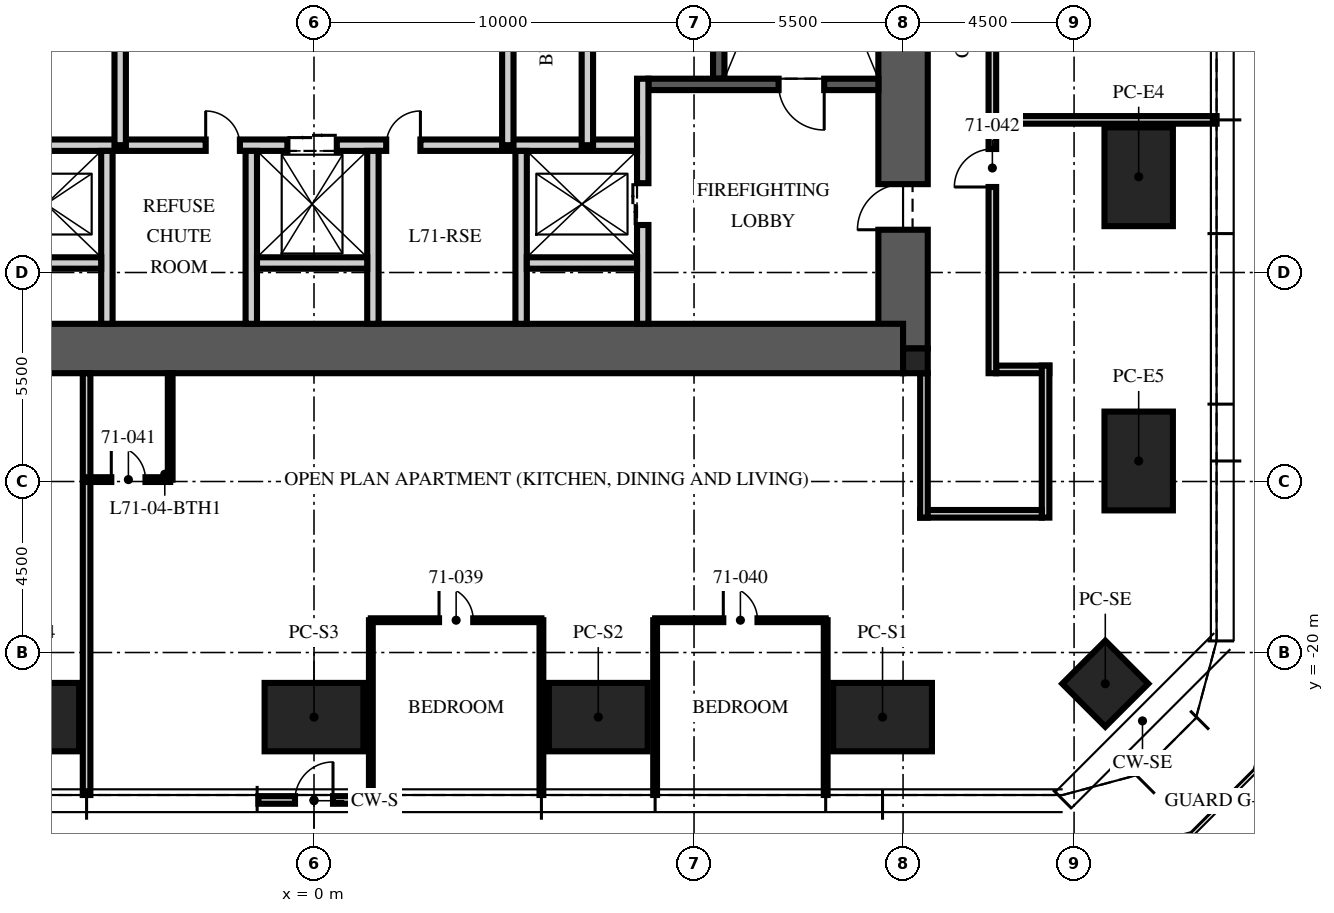
"""IFC4 building model, lengths in metres.
Left out: names, types, materials, properties, quantities, classifications, styles, units other than length and angle.
Written with IfcOpenShell. Run it as: python <this file> out.ifc"""

import sys

from ifc_helpers import new_model, si_unit, direction, frame, frame_2d, origin, origin_2d, place, context, subcontext, project, spatial, rectangle, extrude, element, fill, save


model = new_model("IFC4")
c1 = context("Model", 3, precision=1e-05, world=origin(), true_north=direction((0.0, 1.0)))
c2 = subcontext(c1, "Body", "Model", "MODEL_VIEW")
j1 = project(units=[si_unit("LENGTHUNIT", "METRE"), si_unit("PLANEANGLEUNIT", "RADIAN")], contexts=[c1])
p1 = place(None, origin())
s1 = spatial("IfcSite", under=j1, at=p1, CompositionType="ELEMENT")
p2 = place(p1, origin())
s2 = spatial("IfcBuilding", under=s1, at=p2, CompositionType="ELEMENT")
p3 = place(p2, frame((0.0, 0.0, 285.75)))
s3 = spatial("IfcBuildingStorey", under=s2, at=p3, CompositionType="ELEMENT", Elevation=285.75)
p4 = place(p3, frame((15.5, -12.0, -0.25), z_axis=(0.0, 0.0, 1.0), x_axis=(0.0, 1.0, 0.0)))
e1 = element("IfcWall", 1, at=p4, inside=s3, PredefinedType="SHEAR", context=c2, shape_type="SweptSolid", body=[
    extrude(rectangle(XDim=24.0, YDim=1.3, at=frame_2d((12.0, 0.0))), origin(), (0.0, 0.0, 1.0), 3.75),
])
p5 = place(p4, frame((3.125, 0.0, 0.25)))
e2 = element("IfcOpeningElement", 2, at=p5, cuts=e1, PredefinedType="OPENING", context=c2, shape_type="SweptSolid", body=[
    extrude(rectangle(XDim=1.2, YDim=2.1, at=frame_2d((0.6, 1.05))), frame((0.0, 0.66, 0.0), z_axis=(0.0, -1.0, 0.0), x_axis=(1.0, 0.0, 0.0)), (0.0, 0.0, 1.0), 1.32),
])
p6 = place(p4, frame((19.375, 0.0, 0.25)))
e3 = element("IfcOpeningElement", 3, at=p6, cuts=e1, PredefinedType="OPENING", context=c2, shape_type="SweptSolid", body=[
    extrude(rectangle(XDim=1.8, YDim=2.1, at=frame_2d((0.9, 1.05))), frame((0.0, 0.66, 0.0), z_axis=(0.0, -1.0, 0.0), x_axis=(1.0, 0.0, 0.0)), (0.0, 0.0, 1.0), 1.32),
])
p7 = place(p3, frame((-15.5, -12.0, -0.25), z_axis=(0.0, 0.0, 1.0), x_axis=(1.0, 0.0, 0.0)))
e4 = element("IfcWall", 4, at=p7, inside=s3, PredefinedType="SHEAR", context=c2, shape_type="SweptSolid", body=[
    extrude(rectangle(XDim=31.0, YDim=1.3, at=frame_2d((15.5, 0.0))), origin(), (0.0, 0.0, 1.0), 3.75),
])
p8 = place(p3, frame((15.825, -12.325, -0.25), z_axis=(0.0, 0.0, 1.0), x_axis=(1.0, 0.0, 0.0)))
e5 = element("IfcColumn", 5, at=p8, inside=s3, PredefinedType="COLUMN", context=c2, shape_type="SweptSolid", body=[
    extrude(rectangle(XDim=0.65, YDim=0.65, at=origin_2d()), origin(), (0.0, 0.0, 1.0), 3.75),
])
p9 = place(p3, frame((21.7, -7.48, -0.09), z_axis=(0.0, 0.0, 1.0), x_axis=(0.0, 1.0, 0.0)))
e6 = element("IfcColumn", 6, at=p9, inside=s3, PredefinedType="COLUMN", context=c2, shape_type="SweptSolid", body=[
    extrude(rectangle(XDim=2.6, YDim=1.8, at=origin_2d()), origin(), (0.0, 0.0, 1.0), 3.84),
])
for number, where, z_axis, x_axis in (
    (7, (21.7, -14.96, 0.04), (0.0, 0.0, 1.0), (0.0, 1.0, 0.0)),
    (8, (14.96, -21.7, 0.04), (0.0, 0.0, 1.0), (1.0, 0.0, 0.0)),
):
    element("IfcColumn", number, at=place(p3, frame(where, z_axis=z_axis, x_axis=x_axis)), inside=s3, PredefinedType="COLUMN", context=c2, shape_type="SweptSolid", body=[
        extrude(rectangle(XDim=2.6, YDim=1.8, at=origin_2d()), origin(), (0.0, 0.0, 1.0), 3.71),
    ])
p10 = place(p3, frame((7.48, -21.7, -0.09), z_axis=(0.0, 0.0, 1.0), x_axis=(1.0, 0.0, 0.0)))
e9 = element("IfcColumn", 9, at=p10, inside=s3, PredefinedType="COLUMN", context=c2, shape_type="SweptSolid", body=[
    extrude(rectangle(XDim=2.6, YDim=1.8, at=origin_2d()), origin(), (0.0, 0.0, 1.0), 3.84),
])
p11 = place(p3, frame((0.0, -21.7, -0.23), z_axis=(0.0, 0.0, 1.0), x_axis=(1.0, 0.0, 0.0)))
e10 = element("IfcColumn", 10, at=p11, inside=s3, PredefinedType="COLUMN", context=c2, shape_type="SweptSolid", body=[
    extrude(rectangle(XDim=2.6, YDim=1.8, at=origin_2d()), origin(), (0.0, 0.0, 1.0), 3.98),
])
p12 = place(p3, frame((-7.48, -21.7, -0.09), z_axis=(0.0, 0.0, 1.0), x_axis=(1.0, 0.0, 0.0)))
e11 = element("IfcColumn", 11, at=p12, inside=s3, PredefinedType="COLUMN", context=c2, shape_type="SweptSolid", body=[
    extrude(rectangle(XDim=2.6, YDim=1.8, at=origin_2d()), origin(), (0.0, 0.0, 1.0), 3.84),
])
p13 = place(p3, frame((20.821, -20.821, -0.19), z_axis=(0.0, 0.0, 1.0), x_axis=(0.707106781187, 0.707106781187, 0.0)))
e12 = element("IfcColumn", 12, at=p13, inside=s3, PredefinedType="COLUMN", context=c2, shape_type="SweptSolid", body=[
    extrude(rectangle(XDim=1.6, YDim=1.6, at=origin_2d()), origin(), (0.0, 0.0, 1.0), 3.94),
])
p14 = place(p3, frame((-1.463, -23.88, 0.0), z_axis=(0.0, 0.0, 1.0), x_axis=(1.0, 0.0, 0.0)))
e13 = element("IfcWall", 13, at=p14, inside=s3, PredefinedType="ELEMENTEDWALL", context=c2, shape_type="SweptSolid", body=[
    extrude(rectangle(XDim=2.927, YDim=0.2, at=frame_2d((1.463, 0.0))), origin(), (0.0, 0.0, 1.0), 3.75),
])
p15 = place(p14, frame((0.963, 0.0, 0.0)))
e14 = element("IfcOpeningElement", 14, at=p15, cuts=e13, PredefinedType="OPENING", context=c2, shape_type="SweptSolid", body=[
    extrude(rectangle(XDim=1.0, YDim=2.4, at=frame_2d((0.5, 1.2))), frame((0.0, 0.11, 0.0), z_axis=(0.0, -1.0, 0.0), x_axis=(1.0, 0.0, 0.0)), (0.0, 0.0, 1.0), 0.22),
])
p16 = place(p3, frame((10.65, -4.9, 0.0), z_axis=(0.0, 0.0, 1.0), x_axis=(0.0, 1.0, 0.0)))
e15 = element("IfcWall", 15, at=p16, inside=s3, PredefinedType="SOLIDWALL", context=c2, shape_type="SweptSolid", body=[
    extrude(rectangle(XDim=10.1, YDim=0.3, at=frame_2d((5.05, 0.0))), origin(), (0.0, 0.0, 1.0), 3.5),
])
p17 = place(p3, frame((14.85, -5.05, 0.0), z_axis=(0.0, 0.0, 1.0), x_axis=(-1.0, 0.0, 0.0)))
e16 = element("IfcWall", 16, at=p17, inside=s3, PredefinedType="SOLIDWALL", context=c2, shape_type="SweptSolid", body=[
    extrude(rectangle(XDim=6.05, YDim=0.3, at=frame_2d((3.025, 0.0))), origin(), (0.0, 0.0, 1.0), 3.5),
])
p18 = place(p17, frame((1.425, 0.0, 0.0)))
e17 = element("IfcOpeningElement", 17, at=p18, cuts=e16, PredefinedType="OPENING", context=c2, shape_type="SweptSolid", body=[
    extrude(rectangle(XDim=1.2, YDim=2.1, at=frame_2d((0.6, 1.05))), frame((0.0, 0.16, 0.0), z_axis=(0.0, -1.0, 0.0), x_axis=(1.0, 0.0, 0.0)), (0.0, 0.0, 1.0), 0.32),
])
p19 = place(p3, frame((8.65, -11.35, 0.0), z_axis=(0.0, 0.0, 1.0), x_axis=(0.0, 1.0, 0.0)))
e18 = element("IfcWall", 18, at=p19, inside=s3, PredefinedType="PARTITIONING", context=c2, shape_type="SweptSolid", body=[
    extrude(rectangle(XDim=6.45, YDim=0.3, at=frame_2d((3.225, 0.0))), origin(), (0.0, 0.0, 1.0), 3.5),
])
p20 = place(p19, frame((2.6, 0.0, 0.0)))
e19 = element("IfcOpeningElement", 19, at=p20, cuts=e18, PredefinedType="OPENING", context=c2, shape_type="SweptSolid", body=[
    extrude(rectangle(XDim=1.1, YDim=2.1, at=frame_2d((0.55, 1.05))), frame((0.0, 0.16, 0.0), z_axis=(0.0, -1.0, 0.0), x_axis=(1.0, 0.0, 0.0)), (0.0, 0.0, 1.0), 0.32),
])
p21 = place(p3, frame((-8.5, -6.65, 0.0), z_axis=(0.0, 0.0, 1.0), x_axis=(1.0, 0.0, 0.0)))
e20 = element("IfcWall", 20, at=p21, inside=s3, PredefinedType="PARTITIONING", context=c2, shape_type="SweptSolid", body=[
    extrude(rectangle(XDim=17.0, YDim=0.3, at=frame_2d((8.5, 0.0))), origin(), (0.0, 0.0, 1.0), 3.5),
])
p22 = place(p21, frame((7.8, 0.0, 0.0)))
e21 = element("IfcOpeningElement", 21, at=p22, cuts=e20, PredefinedType="OPENING", context=c2, shape_type="SweptSolid", body=[
    extrude(rectangle(XDim=1.3, YDim=2.4, at=frame_2d((0.65, 1.2))), frame((0.0, 0.16, 0.0), z_axis=(0.0, -1.0, 0.0), x_axis=(1.0, 0.0, 0.0)), (0.0, 0.0, 1.0), 0.32),
])
p23 = place(p21, frame((5.65, 0.0, 0.0)))
e22 = element("IfcOpeningElement", 22, at=p23, cuts=e20, PredefinedType="OPENING", context=c2, shape_type="SweptSolid", body=[
    extrude(rectangle(XDim=0.9, YDim=2.1, at=frame_2d((0.45, 1.05))), frame((0.0, 0.16, 0.0), z_axis=(0.0, -1.0, 0.0), x_axis=(1.0, 0.0, 0.0)), (0.0, 0.0, 1.0), 0.32),
])
p24 = place(p21, frame((10.4, 0.0, 0.0)))
e23 = element("IfcOpeningElement", 23, at=p24, cuts=e20, PredefinedType="OPENING", context=c2, shape_type="SweptSolid", body=[
    extrude(rectangle(XDim=0.9, YDim=2.1, at=frame_2d((0.45, 1.05))), frame((0.0, 0.16, 0.0), z_axis=(0.0, -1.0, 0.0), x_axis=(1.0, 0.0, 0.0)), (0.0, 0.0, 1.0), 0.32),
])
for number, where, z_axis, x_axis in (
    (24, (-5.45, -11.35, 0.0), (0.0, 0.0, 1.0), (0.0, 1.0, 0.0)),
    (25, (-1.65, -11.35, 0.0), (0.0, 0.0, 1.0), (0.0, 1.0, 0.0)),
    (26, (1.55, -11.35, 0.0), (0.0, 0.0, 1.0), (0.0, 1.0, 0.0)),
    (27, (5.45, -11.35, 0.0), (0.0, 0.0, 1.0), (0.0, 1.0, 0.0)),
):
    element("IfcWall", number, at=place(p3, frame(where, z_axis=z_axis, x_axis=x_axis)), inside=s3, PredefinedType="PARTITIONING", context=c2, shape_type="SweptSolid", body=[
        extrude(rectangle(XDim=4.55, YDim=0.3, at=frame_2d((2.275, 0.0))), origin(), (0.0, 0.0, 1.0), 3.5),
    ])
for number, where, z_axis, x_axis in (
    (28, (-8.5, -9.75, 0.0), (0.0, 0.0, 1.0), (1.0, 0.0, 0.0)),
    (29, (-1.5, -9.75, 0.0), (0.0, 0.0, 1.0), (1.0, 0.0, 0.0)),
    (30, (5.6, -9.75, 0.0), (0.0, 0.0, 1.0), (1.0, 0.0, 0.0)),
):
    element("IfcWall", number, at=place(p3, frame(where, z_axis=z_axis, x_axis=x_axis)), inside=s3, PredefinedType="PARTITIONING", context=c2, shape_type="SweptSolid", body=[
        extrude(rectangle(XDim=2.9, YDim=0.3, at=frame_2d((1.45, 0.0))), origin(), (0.0, 0.0, 1.0), 3.5),
    ])
p25 = place(p3, frame((-5.1, -6.65, 0.0), z_axis=(0.0, 0.0, 1.0), x_axis=(0.0, 1.0, 0.0)))
e31 = element("IfcWall", 31, at=p25, inside=s3, PredefinedType="PARTITIONING", context=c2, shape_type="SweptSolid", body=[
    extrude(rectangle(XDim=9.45, YDim=0.3, at=frame_2d((4.725, 0.0))), origin(), (0.0, 0.0, 1.0), 3.5),
])
p26 = place(p25, frame((2.648, 0.0, 0.0)))
e32 = element("IfcOpeningElement", 32, at=p26, cuts=e31, PredefinedType="OPENING", context=c2, shape_type="SweptSolid", body=[
    extrude(rectangle(XDim=0.9, YDim=2.1, at=frame_2d((0.45, 1.05))), frame((0.0, 0.16, 0.0), z_axis=(0.0, -1.0, 0.0), x_axis=(1.0, 0.0, 0.0)), (0.0, 0.0, 1.0), 0.32),
])
p27 = place(p25, frame((7.373, 0.0, 0.0)))
e33 = element("IfcOpeningElement", 33, at=p27, cuts=e31, PredefinedType="OPENING", context=c2, shape_type="SweptSolid", body=[
    extrude(rectangle(XDim=0.9, YDim=2.1, at=frame_2d((0.45, 1.05))), frame((0.0, 0.16, 0.0), z_axis=(0.0, -1.0, 0.0), x_axis=(1.0, 0.0, 0.0)), (0.0, 0.0, 1.0), 0.32),
])
p28 = place(p3, frame((5.1, -6.65, 0.0), z_axis=(0.0, 0.0, 1.0), x_axis=(0.0, 1.0, 0.0)))
e34 = element("IfcWall", 34, at=p28, inside=s3, PredefinedType="PARTITIONING", context=c2, shape_type="SweptSolid", body=[
    extrude(rectangle(XDim=9.45, YDim=0.3, at=frame_2d((4.725, 0.0))), origin(), (0.0, 0.0, 1.0), 3.5),
])
p29 = place(p28, frame((4.275, 0.0, 0.0)))
e35 = element("IfcOpeningElement", 35, at=p29, cuts=e34, PredefinedType="OPENING", context=c2, shape_type="SweptSolid", body=[
    extrude(rectangle(XDim=0.9, YDim=2.1, at=frame_2d((0.45, 1.05))), frame((0.0, 0.16, 0.0), z_axis=(0.0, -1.0, 0.0), x_axis=(1.0, 0.0, 0.0)), (0.0, 0.0, 1.0), 0.32),
])
p30 = place(p3, frame((7.193, -6.65, 0.0), z_axis=(0.0, 0.0, 1.0), x_axis=(0.0, 1.0, 0.0)))
e36 = element("IfcWall", 36, at=p30, inside=s3, PredefinedType="PARTITIONING", context=c2, shape_type="SweptSolid", body=[
    extrude(rectangle(XDim=9.45, YDim=0.3, at=frame_2d((4.725, 0.0))), origin(), (0.0, 0.0, 1.0), 3.5),
])
p31 = place(p3, frame((17.95, -12.55, 0.0), z_axis=(0.0, 0.0, 1.0), x_axis=(1.0, 0.0, 0.0)))
e37 = element("IfcWall", 37, at=p31, inside=s3, PredefinedType="PARTITIONING", context=c2, shape_type="SweptSolid", body=[
    extrude(rectangle(XDim=1.4, YDim=0.2, at=frame_2d((0.7, 0.0))), origin(), (0.0, 0.0, 1.0), 3.5),
])
p32 = place(p3, frame((19.25, -12.45, 0.0), z_axis=(0.0, 0.0, 1.0), x_axis=(0.0, -1.0, 0.0)))
e38 = element("IfcWall", 38, at=p32, inside=s3, PredefinedType="PARTITIONING", context=c2, shape_type="SweptSolid", body=[
    extrude(rectangle(XDim=4.0, YDim=0.2, at=frame_2d((2.0, 0.0))), origin(), (0.0, 0.0, 1.0), 2.9),
])
p33 = place(p3, frame((19.15, -16.35, 0.0), z_axis=(0.0, 0.0, 1.0), x_axis=(-1.0, 0.0, 0.0)))
e39 = element("IfcWall", 39, at=p33, inside=s3, PredefinedType="PARTITIONING", context=c2, shape_type="SweptSolid", body=[
    extrude(rectangle(XDim=3.2, YDim=0.2, at=frame_2d((1.6, 0.0))), origin(), (0.0, 0.0, 1.0), 2.6),
])
p34 = place(p3, frame((16.05, -16.45, 0.0), z_axis=(0.0, 0.0, 1.0), x_axis=(0.0, 1.0, 0.0)))
e40 = element("IfcWall", 40, at=p34, inside=s3, PredefinedType="PARTITIONING", context=c2, shape_type="SweptSolid", body=[
    extrude(rectangle(XDim=3.8, YDim=0.2, at=frame_2d((1.9, 0.0))), origin(), (0.0, 0.0, 1.0), 2.6),
])
p35 = place(p3, frame((17.95, -5.984, 0.0), z_axis=(0.0, 0.0, 1.0), x_axis=(1.0, 0.0, 0.0)))
e41 = element("IfcWall", 41, at=p35, inside=s3, PredefinedType="PARTITIONING", context=c2, shape_type="SweptSolid", body=[
    extrude(rectangle(XDim=5.8, YDim=0.2, at=frame_2d((2.9, 0.0))), origin(), (0.0, 0.0, 1.0), 3.01),
])
p36 = place(p3, frame((-5.984, -12.65, 0.0), z_axis=(0.0, 0.0, 1.0), x_axis=(0.0, -1.0, 0.0)))
e42 = element("IfcWall", 42, at=p36, inside=s3, PredefinedType="PARTITIONING", context=c2, shape_type="SweptSolid", body=[
    extrude(rectangle(XDim=11.1, YDim=0.2, at=frame_2d((5.55, 0.0))), origin(), (0.0, 0.0, 1.0), 3.01),
])
for number, where, z_axis, x_axis in (
    (43, (1.496, -19.15, 0.0), (0.0, 0.0, 1.0), (0.0, -1.0, 0.0)),
    (44, (5.984, -19.15, 0.0), (0.0, 0.0, 1.0), (0.0, -1.0, 0.0)),
    (45, (8.976, -19.15, 0.0), (0.0, 0.0, 1.0), (0.0, -1.0, 0.0)),
    (46, (13.464, -19.15, 0.0), (0.0, 0.0, 1.0), (0.0, -1.0, 0.0)),
):
    element("IfcWall", number, at=place(p3, frame(where, z_axis=z_axis, x_axis=x_axis)), inside=s3, PredefinedType="PARTITIONING", context=c2, shape_type="SweptSolid", body=[
        extrude(rectangle(XDim=4.6, YDim=0.1, at=frame_2d((2.3, 0.0))), origin(), (0.0, 0.0, 1.0), 3.01),
    ])
p37 = place(p3, frame((1.496, -19.15, 0.0), z_axis=(0.0, 0.0, 1.0), x_axis=(1.0, 0.0, 0.0)))
e47 = element("IfcWall", 47, at=p37, inside=s3, PredefinedType="PARTITIONING", context=c2, shape_type="SweptSolid", body=[
    extrude(rectangle(XDim=4.488, YDim=0.1, at=frame_2d((2.244, 0.0))), origin(), (0.0, 0.0, 1.0), 2.91),
])
p38 = place(p37, frame((1.794, 0.0, 0.0)))
e48 = element("IfcOpeningElement", 48, at=p38, cuts=e47, PredefinedType="OPENING", context=c2, shape_type="SweptSolid", body=[
    extrude(rectangle(XDim=0.9, YDim=2.1, at=frame_2d((0.45, 1.05))), frame((0.0, 0.06, 0.0), z_axis=(0.0, -1.0, 0.0), x_axis=(1.0, 0.0, 0.0)), (0.0, 0.0, 1.0), 0.12),
])
p39 = place(p3, frame((8.976, -19.15, 0.0), z_axis=(0.0, 0.0, 1.0), x_axis=(1.0, 0.0, 0.0)))
e49 = element("IfcWall", 49, at=p39, inside=s3, PredefinedType="PARTITIONING", context=c2, shape_type="SweptSolid", body=[
    extrude(rectangle(XDim=4.488, YDim=0.1, at=frame_2d((2.244, 0.0))), origin(), (0.0, 0.0, 1.0), 2.91),
])
p40 = place(p39, frame((1.794, 0.0, 0.0)))
e50 = element("IfcOpeningElement", 50, at=p40, cuts=e49, PredefinedType="OPENING", context=c2, shape_type="SweptSolid", body=[
    extrude(rectangle(XDim=0.9, YDim=2.1, at=frame_2d((0.45, 1.05))), frame((0.0, 0.06, 0.0), z_axis=(0.0, -1.0, 0.0), x_axis=(1.0, 0.0, 0.0)), (0.0, 0.0, 1.0), 0.12),
])
p41 = place(p3, frame((-5.984, -15.45, 0.0), z_axis=(0.0, 0.0, 1.0), x_axis=(1.0, 0.0, 0.0)))
e51 = element("IfcWall", 51, at=p41, inside=s3, PredefinedType="PARTITIONING", context=c2, shape_type="SweptSolid", body=[
    extrude(rectangle(XDim=2.2, YDim=0.125, at=frame_2d((1.1, 0.0))), origin(), (0.0, 0.0, 1.0), 2.91),
])
p42 = place(p41, frame((0.65, 0.0, 0.0)))
e52 = element("IfcOpeningElement", 52, at=p42, cuts=e51, PredefinedType="OPENING", context=c2, shape_type="SweptSolid", body=[
    extrude(rectangle(XDim=0.9, YDim=2.1, at=frame_2d((0.45, 1.05))), frame((0.0, 0.073, 0.0), z_axis=(0.0, -1.0, 0.0), x_axis=(1.0, 0.0, 0.0)), (0.0, 0.0, 1.0), 0.145),
])
p43 = place(p3, frame((-3.784, -12.65, 0.0), z_axis=(0.0, 0.0, 1.0), x_axis=(0.0, -1.0, 0.0)))
e53 = element("IfcWall", 53, at=p43, inside=s3, PredefinedType="PARTITIONING", context=c2, shape_type="SweptSolid", body=[
    extrude(rectangle(XDim=2.8, YDim=0.125, at=frame_2d((1.4, 0.0))), origin(), (0.0, 0.0, 1.0), 2.91),
])
p44 = place(p3, frame((17.85, -12.65, 0.0), z_axis=(0.0, 0.0, 1.0), x_axis=(0.0, 1.0, 0.0)))
e54 = element("IfcWall", 54, at=p44, inside=s3, PredefinedType="PARTITIONING", context=c2, shape_type="SweptSolid", body=[
    extrude(rectangle(XDim=25.5, YDim=0.2, at=frame_2d((12.75, 0.0))), origin(), (0.0, 0.0, 1.0), 2.9),
])
p45 = place(p44, frame((23.186, 0.0, 0.0)))
e55 = element("IfcOpeningElement", 55, at=p45, cuts=e54, PredefinedType="OPENING", context=c2, shape_type="SweptSolid", body=[
    extrude(rectangle(XDim=1.0, YDim=2.2, at=frame_2d((0.5, 1.1))), frame((0.0, 0.11, 0.0), z_axis=(0.0, -1.0, 0.0), x_axis=(1.0, 0.0, 0.0)), (0.0, 0.0, 1.0), 0.22),
])
p46 = place(p44, frame((4.9, 0.0, 0.0)))
e56 = element("IfcOpeningElement", 56, at=p46, cuts=e54, PredefinedType="OPENING", context=c2, shape_type="SweptSolid", body=[
    extrude(rectangle(XDim=1.0, YDim=2.2, at=frame_2d((0.5, 1.1))), frame((0.0, 0.11, 0.0), z_axis=(0.0, -1.0, 0.0), x_axis=(1.0, 0.0, 0.0)), (0.0, 0.0, 1.0), 0.22),
])
p47 = place(p15, origin())
e57 = element("IfcDoor", 57, at=p47, inside=s3, OperationType="SINGLE_SWING_LEFT", PredefinedType="DOOR", context=c2, shape_type="SweptSolid", body=[
    extrude(rectangle(XDim=1.0, YDim=2.4, at=frame_2d((0.5, 1.2))), frame((0.0, 0.025, 0.0), z_axis=(0.0, -1.0, 0.0), x_axis=(1.0, 0.0, 0.0)), (0.0, 0.0, 1.0), 0.05),
])
fill(e14, e57)
p48 = place(p18, origin())
e58 = element("IfcDoor", 58, at=p48, inside=s3, OperationType="SINGLE_SWING_LEFT", PredefinedType="DOOR", context=c2, shape_type="SweptSolid", body=[
    extrude(rectangle(XDim=1.2, YDim=2.1, at=frame_2d((0.6, 1.05))), frame((0.0, 0.025, 0.0), z_axis=(0.0, -1.0, 0.0), x_axis=(1.0, 0.0, 0.0)), (0.0, 0.0, 1.0), 0.05),
])
fill(e17, e58)
p49 = place(p5, origin())
e59 = element("IfcDoor", 59, at=p49, inside=s3, OperationType="SINGLE_SWING_LEFT", PredefinedType="DOOR", context=c2, shape_type="SweptSolid", body=[
    extrude(rectangle(XDim=1.2, YDim=2.1, at=frame_2d((0.6, 1.05))), frame((0.0, 0.025, 0.0), z_axis=(0.0, -1.0, 0.0), x_axis=(1.0, 0.0, 0.0)), (0.0, 0.0, 1.0), 0.05),
])
fill(e2, e59)
p50 = place(p20, origin())
e60 = element("IfcDoor", 60, at=p50, inside=s3, OperationType="DOUBLE_DOOR_SLIDING", PredefinedType="DOOR", context=c2, shape_type="SweptSolid", body=[
    extrude(rectangle(XDim=1.1, YDim=2.1, at=frame_2d((0.55, 1.05))), frame((0.0, 0.025, 0.0), z_axis=(0.0, -1.0, 0.0), x_axis=(1.0, 0.0, 0.0)), (0.0, 0.0, 1.0), 0.05),
])
fill(e19, e60)
p51 = place(p22, origin())
e61 = element("IfcDoor", 61, at=p51, inside=s3, OperationType="DOUBLE_DOOR_SLIDING", PredefinedType="DOOR", context=c2, shape_type="SweptSolid", body=[
    extrude(rectangle(XDim=1.3, YDim=2.4, at=frame_2d((0.65, 1.2))), frame((0.0, 0.025, 0.0), z_axis=(0.0, -1.0, 0.0), x_axis=(1.0, 0.0, 0.0)), (0.0, 0.0, 1.0), 0.05),
])
fill(e21, e61)
p52 = place(p23, origin())
e62 = element("IfcDoor", 62, at=p52, inside=s3, OperationType="SINGLE_SWING_LEFT", PredefinedType="DOOR", context=c2, shape_type="SweptSolid", body=[
    extrude(rectangle(XDim=0.9, YDim=2.1, at=frame_2d((0.45, 1.05))), frame((0.0, 0.025, 0.0), z_axis=(0.0, -1.0, 0.0), x_axis=(1.0, 0.0, 0.0)), (0.0, 0.0, 1.0), 0.05),
])
fill(e22, e62)
p53 = place(p24, origin())
e63 = element("IfcDoor", 63, at=p53, inside=s3, OperationType="SINGLE_SWING_RIGHT", PredefinedType="DOOR", context=c2, shape_type="SweptSolid", body=[
    extrude(rectangle(XDim=0.9, YDim=2.1, at=frame_2d((0.45, 1.05))), frame((0.0, 0.025, 0.0), z_axis=(0.0, -1.0, 0.0), x_axis=(1.0, 0.0, 0.0)), (0.0, 0.0, 1.0), 0.05),
])
fill(e23, e63)
p54 = place(p38, origin())
e64 = element("IfcDoor", 64, at=p54, inside=s3, OperationType="SINGLE_SWING_LEFT", PredefinedType="DOOR", context=c2, shape_type="SweptSolid", body=[
    extrude(rectangle(XDim=0.9, YDim=2.1, at=frame_2d((0.45, 1.05))), frame((0.0, 0.025, 0.0), z_axis=(0.0, -1.0, 0.0), x_axis=(1.0, 0.0, 0.0)), (0.0, 0.0, 1.0), 0.05),
])
fill(e48, e64)
p55 = place(p40, origin())
e65 = element("IfcDoor", 65, at=p55, inside=s3, OperationType="SINGLE_SWING_LEFT", PredefinedType="DOOR", context=c2, shape_type="SweptSolid", body=[
    extrude(rectangle(XDim=0.9, YDim=2.1, at=frame_2d((0.45, 1.05))), frame((0.0, 0.025, 0.0), z_axis=(0.0, -1.0, 0.0), x_axis=(1.0, 0.0, 0.0)), (0.0, 0.0, 1.0), 0.05),
])
fill(e50, e65)
p56 = place(p42, origin())
e66 = element("IfcDoor", 66, at=p56, inside=s3, OperationType="SINGLE_SWING_LEFT", PredefinedType="DOOR", context=c2, shape_type="SweptSolid", body=[
    extrude(rectangle(XDim=0.9, YDim=2.1, at=frame_2d((0.45, 1.05))), frame((0.0, 0.025, 0.0), z_axis=(0.0, -1.0, 0.0), x_axis=(1.0, 0.0, 0.0)), (0.0, 0.0, 1.0), 0.05),
])
fill(e52, e66)
p57 = place(p46, origin())
e67 = element("IfcDoor", 67, at=p57, inside=s3, OperationType="SINGLE_SWING_LEFT", PredefinedType="DOOR", context=c2, shape_type="SweptSolid", body=[
    extrude(rectangle(XDim=1.0, YDim=2.2, at=frame_2d((0.5, 1.1))), frame((0.0, 0.025, 0.0), z_axis=(0.0, -1.0, 0.0), x_axis=(1.0, 0.0, 0.0)), (0.0, 0.0, 1.0), 0.05),
])
fill(e56, e67)
save(model, sys.argv[1])
